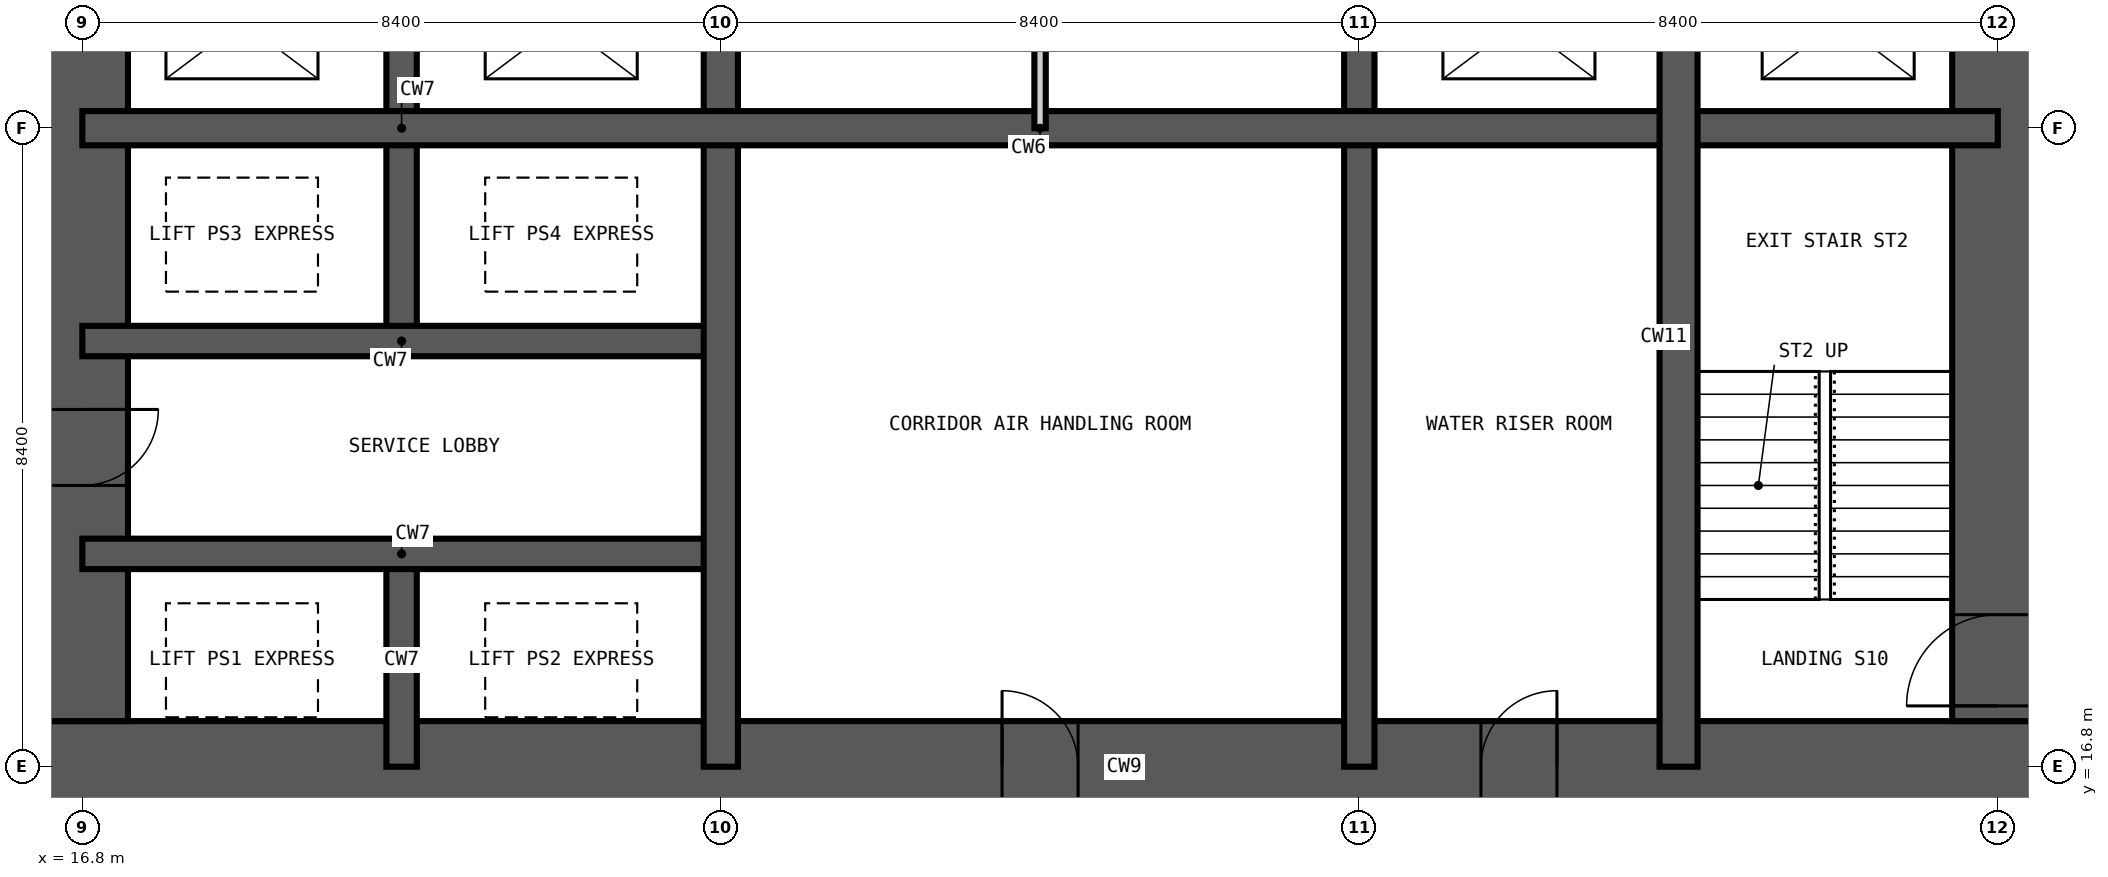
"""IFC4 building model, lengths in metres.
Left out: names, types, materials, properties, quantities, classifications, styles, units other than length and angle.
Written with IfcOpenShell. Run it as: python <this file> out.ifc"""

import sys

from ifc_helpers import new_model, si_unit, direction, frame, frame_2d, origin, place, context, subcontext, project, spatial, rectangle, extrude, element, fill, save


model = new_model("IFC4")
c1 = context("Model", 3, precision=1e-05, world=origin(), true_north=direction((0.0, 1.0)))
c2 = subcontext(c1, "Body", "Model", "MODEL_VIEW")
j1 = project(units=[si_unit("LENGTHUNIT", "METRE"), si_unit("PLANEANGLEUNIT", "RADIAN")], contexts=[c1])
p1 = place(None, origin())
s1 = spatial("IfcSite", under=j1, at=p1, CompositionType="ELEMENT")
p2 = place(p1, origin())
s2 = spatial("IfcBuilding", under=s1, at=p2, CompositionType="ELEMENT")
p3 = place(p2, frame((0.0, 0.0, 144.0)))
s3 = spatial("IfcBuildingStorey", under=s2, at=p3, CompositionType="ELEMENT", Elevation=144.0)
p4 = place(p3, frame((16.2, 16.8, -0.35), z_axis=(0.0, 0.0, 1.0), x_axis=(1.0, 0.0, 0.0)))
e1 = element("IfcWall", 1, at=p4, inside=s3, PredefinedType="SHEAR", context=c2, shape_type="SweptSolid", body=[
    extrude(rectangle(XDim=26.4, YDim=1.2, at=frame_2d((13.2, 0.0))), origin(), (0.0, 0.0, 1.0), 3.6),
])
p5 = place(p4, frame((12.7, 0.0, 0.35)))
e2 = element("IfcOpeningElement", 2, at=p5, cuts=e1, PredefinedType="OPENING", context=c2, shape_type="SweptSolid", body=[
    extrude(rectangle(XDim=1.0, YDim=2.1, at=frame_2d((0.5, 1.05))), frame((0.0, 0.61, 0.0), z_axis=(0.0, -1.0, 0.0), x_axis=(1.0, 0.0, 0.0)), (0.0, 0.0, 1.0), 1.22),
])
p6 = place(p4, frame((19.0, 0.0, 0.35)))
e3 = element("IfcOpeningElement", 3, at=p6, cuts=e1, PredefinedType="OPENING", context=c2, shape_type="SweptSolid", body=[
    extrude(rectangle(XDim=1.0, YDim=2.1, at=frame_2d((0.5, 1.05))), frame((0.0, 0.61, 0.0), z_axis=(0.0, -1.0, 0.0), x_axis=(1.0, 0.0, 0.0)), (0.0, 0.0, 1.0), 1.22),
])
p7 = place(p3, frame((42.0, 17.4, -0.35), z_axis=(0.0, 0.0, 1.0), x_axis=(0.0, 1.0, 0.0)))
e4 = element("IfcWall", 4, at=p7, inside=s3, PredefinedType="SHEAR", context=c2, shape_type="SweptSolid", body=[
    extrude(rectangle(XDim=24.0, YDim=1.2, at=frame_2d((12.0, 0.0))), origin(), (0.0, 0.0, 1.0), 3.6),
])
p8 = place(p7, frame((0.2, 0.0, 0.35)))
e5 = element("IfcOpeningElement", 5, at=p8, cuts=e4, PredefinedType="OPENING", context=c2, shape_type="SweptSolid", body=[
    extrude(rectangle(XDim=1.2, YDim=2.2, at=frame_2d((0.6, 1.1))), frame((0.0, 0.61, 0.0), z_axis=(0.0, -1.0, 0.0), x_axis=(1.0, 0.0, 0.0)), (0.0, 0.0, 1.0), 1.22),
])
p9 = place(p7, frame((11.1, 0.0, 0.35)))
e6 = element("IfcOpeningElement", 6, at=p9, cuts=e4, PredefinedType="OPENING", context=c2, shape_type="SweptSolid", body=[
    extrude(rectangle(XDim=1.8, YDim=2.2, at=frame_2d((0.9, 1.1))), frame((0.0, 0.61, 0.0), z_axis=(0.0, -1.0, 0.0), x_axis=(1.0, 0.0, 0.0)), (0.0, 0.0, 1.0), 1.22),
])
p10 = place(p7, frame((19.9, 0.0, 0.35)))
e7 = element("IfcOpeningElement", 7, at=p10, cuts=e4, PredefinedType="OPENING", context=c2, shape_type="SweptSolid", body=[
    extrude(rectangle(XDim=1.0, YDim=2.1, at=frame_2d((0.5, 1.05))), frame((0.0, 0.61, 0.0), z_axis=(0.0, -1.0, 0.0), x_axis=(1.0, 0.0, 0.0)), (0.0, 0.0, 1.0), 1.22),
])
p11 = place(p3, frame((16.8, 41.4, -0.35), z_axis=(0.0, 0.0, 1.0), x_axis=(0.0, -1.0, 0.0)))
e8 = element("IfcWall", 8, at=p11, inside=s3, PredefinedType="SHEAR", context=c2, shape_type="SweptSolid", body=[
    extrude(rectangle(XDim=24.0, YDim=1.2, at=frame_2d((12.0, 0.0))), origin(), (0.0, 0.0, 1.0), 3.6),
])
p12 = place(p11, frame((11.1, 0.0, 0.35)))
e9 = element("IfcOpeningElement", 9, at=p12, cuts=e8, PredefinedType="OPENING", context=c2, shape_type="SweptSolid", body=[
    extrude(rectangle(XDim=1.8, YDim=2.2, at=frame_2d((0.9, 1.1))), frame((0.0, 0.61, 0.0), z_axis=(0.0, -1.0, 0.0), x_axis=(1.0, 0.0, 0.0)), (0.0, 0.0, 1.0), 1.22),
])
p13 = place(p11, frame((19.9, 0.0, 0.35)))
e10 = element("IfcOpeningElement", 10, at=p13, cuts=e8, PredefinedType="OPENING", context=c2, shape_type="SweptSolid", body=[
    extrude(rectangle(XDim=1.0, YDim=2.1, at=frame_2d((0.5, 1.05))), frame((0.0, 0.61, 0.0), z_axis=(0.0, -1.0, 0.0), x_axis=(1.0, 0.0, 0.0)), (0.0, 0.0, 1.0), 1.22),
])
p14 = place(p11, frame((5.2, 0.0, 0.35)))
e11 = element("IfcOpeningElement", 11, at=p14, cuts=e8, PredefinedType="OPENING", context=c2, shape_type="SweptSolid", body=[
    extrude(rectangle(XDim=1.0, YDim=2.1, at=frame_2d((0.5, 1.05))), frame((0.0, 0.61, 0.0), z_axis=(0.0, -1.0, 0.0), x_axis=(1.0, 0.0, 0.0)), (0.0, 0.0, 1.0), 1.22),
])
p15 = place(p3, frame((21.0, 16.8, -0.35), z_axis=(0.0, 0.0, 1.0), x_axis=(0.0, 1.0, 0.0)))
e12 = element("IfcWall", 12, at=p15, inside=s3, PredefinedType="SHEAR", context=c2, shape_type="SweptSolid", body=[
    extrude(rectangle(XDim=2.8, YDim=0.4, at=frame_2d((1.4, 0.0))), origin(), (0.0, 0.0, 1.0), 3.6),
])
p16 = place(p3, frame((21.0, 22.4, -0.35), z_axis=(0.0, 0.0, 1.0), x_axis=(0.0, 1.0, 0.0)))
e13 = element("IfcWall", 13, at=p16, inside=s3, PredefinedType="SHEAR", context=c2, shape_type="SweptSolid", body=[
    extrude(rectangle(XDim=5.6, YDim=0.4, at=frame_2d((2.8, 0.0))), origin(), (0.0, 0.0, 1.0), 3.6),
])
p17 = place(p3, frame((33.6, 16.8, -0.35), z_axis=(0.0, 0.0, 1.0), x_axis=(0.0, 1.0, 0.0)))
e14 = element("IfcWall", 14, at=p17, inside=s3, PredefinedType="SHEAR", context=c2, shape_type="SweptSolid", body=[
    extrude(rectangle(XDim=25.2, YDim=0.4, at=frame_2d((12.6, 0.0))), origin(), (0.0, 0.0, 1.0), 3.6),
])
p18 = place(p17, frame((22.5, 0.0, 0.35)))
e15 = element("IfcOpeningElement", 15, at=p18, cuts=e14, PredefinedType="OPENING", context=c2, shape_type="SweptSolid", body=[
    extrude(rectangle(XDim=1.2, YDim=2.2, at=frame_2d((0.6, 1.1))), frame((0.0, 0.21, 0.0), z_axis=(0.0, -1.0, 0.0), x_axis=(1.0, 0.0, 0.0)), (0.0, 0.0, 1.0), 0.42),
])
p19 = place(p17, frame((18.3, 0.0, 0.35)))
e16 = element("IfcOpeningElement", 16, at=p19, cuts=e14, PredefinedType="OPENING", context=c2, shape_type="SweptSolid", body=[
    extrude(rectangle(XDim=1.2, YDim=2.2, at=frame_2d((0.6, 1.1))), frame((0.0, 0.21, 0.0), z_axis=(0.0, -1.0, 0.0), x_axis=(1.0, 0.0, 0.0)), (0.0, 0.0, 1.0), 0.42),
])
for number, where, z_axis, x_axis in (
    (17, (16.8, 19.6, -0.35), (0.0, 0.0, 1.0), (1.0, 0.0, 0.0)),
    (18, (16.8, 22.4, -0.35), (0.0, 0.0, 1.0), (1.0, 0.0, 0.0)),
):
    element("IfcWall", number, at=place(p3, frame(where, z_axis=z_axis, x_axis=x_axis)), inside=s3, PredefinedType="SHEAR", context=c2, shape_type="SweptSolid", body=[
        extrude(rectangle(XDim=8.4, YDim=0.4, at=frame_2d((4.2, 0.0))), origin(), (0.0, 0.0, 1.0), 3.6),
    ])
p20 = place(p3, frame((25.2, 16.8, -0.35), z_axis=(0.0, 0.0, 1.0), x_axis=(0.0, 1.0, 0.0)))
e19 = element("IfcWall", 19, at=p20, inside=s3, PredefinedType="SHEAR", context=c2, shape_type="SweptSolid", body=[
    extrude(rectangle(XDim=25.2, YDim=0.45, at=frame_2d((12.6, 0.0))), origin(), (0.0, 0.0, 1.0), 3.6),
])
p21 = place(p20, frame((12.1, 0.0, 0.35)))
e20 = element("IfcOpeningElement", 20, at=p21, cuts=e19, PredefinedType="OPENING", context=c2, shape_type="SweptSolid", body=[
    extrude(rectangle(XDim=1.0, YDim=2.1, at=frame_2d((0.5, 1.05))), frame((0.0, 0.235, 0.0), z_axis=(0.0, -1.0, 0.0), x_axis=(1.0, 0.0, 0.0)), (0.0, 0.0, 1.0), 0.47),
])
p22 = place(p3, frame((16.8, 25.2, -0.35), z_axis=(0.0, 0.0, 1.0), x_axis=(1.0, 0.0, 0.0)))
e21 = element("IfcWall", 21, at=p22, inside=s3, PredefinedType="SHEAR", context=c2, shape_type="SweptSolid", body=[
    extrude(rectangle(XDim=25.2, YDim=0.45, at=frame_2d((12.6, 0.0))), origin(), (0.0, 0.0, 1.0), 3.6),
])
p23 = place(p3, frame((37.8, 16.8, -0.35), z_axis=(0.0, 0.0, 1.0), x_axis=(0.0, 1.0, 0.0)))
e22 = element("IfcWall", 22, at=p23, inside=s3, PredefinedType="SHEAR", context=c2, shape_type="SweptSolid", body=[
    extrude(rectangle(XDim=11.2, YDim=0.5, at=frame_2d((5.6, 0.0))), origin(), (0.0, 0.0, 1.0), 3.6),
])
p24 = place(p3, frame((29.4, 25.2, 0.0), z_axis=(0.0, 0.0, 1.0), x_axis=(0.0, 1.0, 0.0)))
e23 = element("IfcWall", 23, at=p24, inside=s3, PredefinedType="PARTITIONING", context=c2, shape_type="SweptSolid", body=[
    extrude(rectangle(XDim=8.4, YDim=0.15, at=frame_2d((4.2, 0.0))), origin(), (0.0, 0.0, 1.0), 3.25),
])
p25 = place(p24, frame((3.7, 0.0, 0.0)))
e24 = element("IfcOpeningElement", 24, at=p25, cuts=e23, PredefinedType="OPENING", context=c2, shape_type="SweptSolid", body=[
    extrude(rectangle(XDim=1.0, YDim=2.1, at=frame_2d((0.5, 1.05))), frame((0.0, 0.085, 0.0), z_axis=(0.0, -1.0, 0.0), x_axis=(1.0, 0.0, 0.0)), (0.0, 0.0, 1.0), 0.17),
])
p26 = place(p8, origin())
e25 = element("IfcDoor", 25, at=p26, inside=s3, OperationType="SINGLE_SWING_LEFT", PredefinedType="DOOR", context=c2, shape_type="SweptSolid", body=[
    extrude(rectangle(XDim=1.2, YDim=2.2, at=frame_2d((0.6, 1.1))), frame((0.0, 0.025, 0.0), z_axis=(0.0, -1.0, 0.0), x_axis=(1.0, 0.0, 0.0)), (0.0, 0.0, 1.0), 0.05),
])
fill(e5, e25)
p27 = place(p13, origin())
e26 = element("IfcDoor", 26, at=p27, inside=s3, OperationType="SINGLE_SWING_LEFT", PredefinedType="DOOR", context=c2, shape_type="SweptSolid", body=[
    extrude(rectangle(XDim=1.0, YDim=2.1, at=frame_2d((0.5, 1.05))), frame((0.0, 0.025, 0.0), z_axis=(0.0, -1.0, 0.0), x_axis=(1.0, 0.0, 0.0)), (0.0, 0.0, 1.0), 0.05),
])
fill(e10, e26)
p28 = place(p5, origin())
e27 = element("IfcDoor", 27, at=p28, inside=s3, OperationType="SINGLE_SWING_LEFT", PredefinedType="DOOR", context=c2, shape_type="SweptSolid", body=[
    extrude(rectangle(XDim=1.0, YDim=2.1, at=frame_2d((0.5, 1.05))), frame((0.0, 0.025, 0.0), z_axis=(0.0, -1.0, 0.0), x_axis=(1.0, 0.0, 0.0)), (0.0, 0.0, 1.0), 0.05),
])
fill(e2, e27)
p29 = place(p6, origin())
e28 = element("IfcDoor", 28, at=p29, inside=s3, OperationType="SINGLE_SWING_RIGHT", PredefinedType="DOOR", context=c2, shape_type="SweptSolid", body=[
    extrude(rectangle(XDim=1.0, YDim=2.1, at=frame_2d((0.5, 1.05))), frame((0.0, 0.025, 0.0), z_axis=(0.0, -1.0, 0.0), x_axis=(1.0, 0.0, 0.0)), (0.0, 0.0, 1.0), 0.05),
])
fill(e3, e28)
save(model, sys.argv[1])
